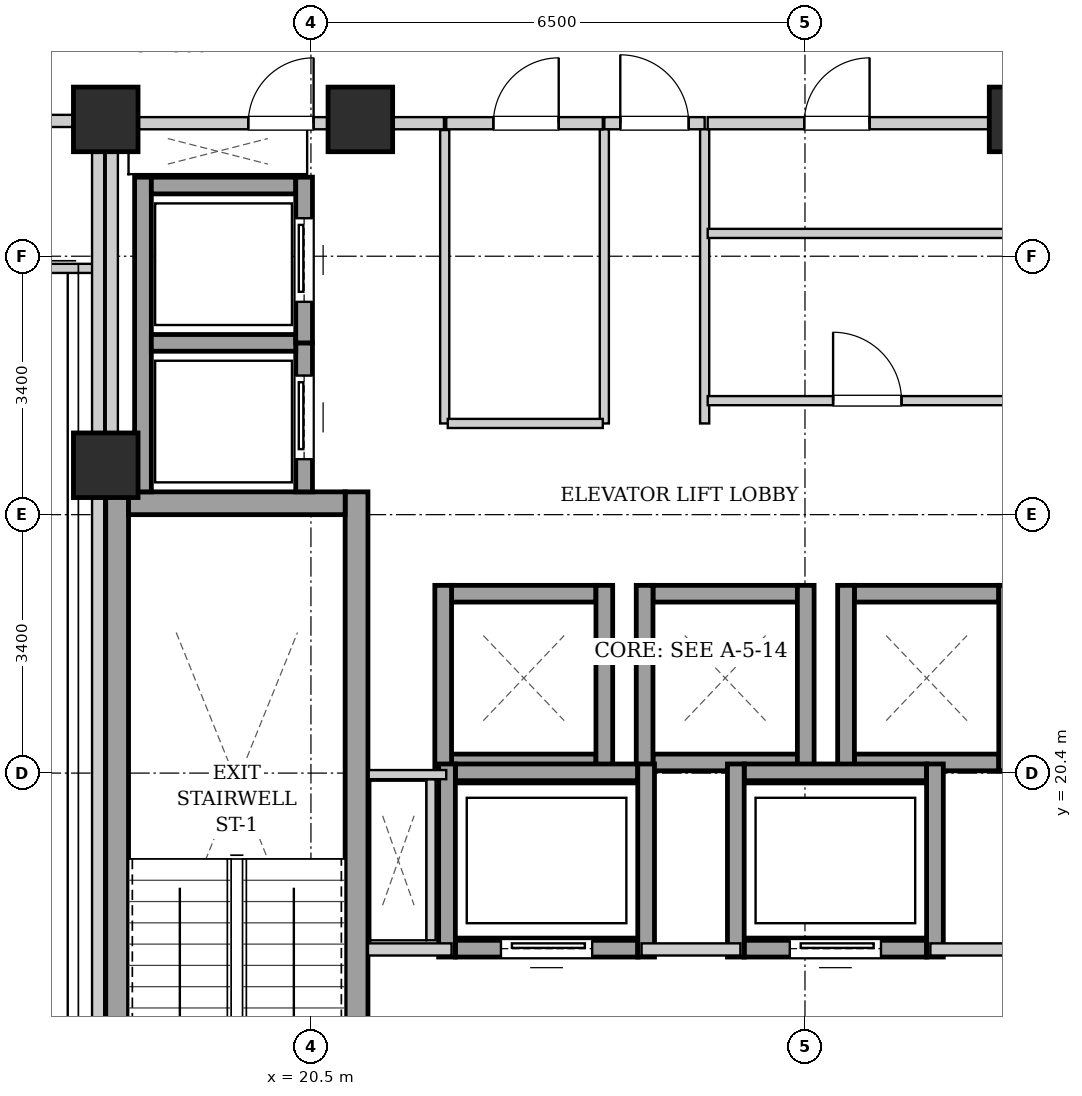
"""IFC4 building model, lengths in metres.
Left out: names, types, materials, properties, quantities, classifications, styles, units other than length and angle.
Written with IfcOpenShell. Run it as: python <this file> out.ifc"""

import sys

from ifc_helpers import new_model, si_unit, direction, frame, frame_2d, origin, origin_2d, place, context, subcontext, project, spatial, rectangle, extrude, element, fill, save


model = new_model("IFC4")
c1 = context("Model", 3, precision=1e-05, world=origin(), true_north=direction((0.0, 1.0)))
c2 = subcontext(c1, "Body", "Model", "MODEL_VIEW")
j1 = project(units=[si_unit("LENGTHUNIT", "METRE"), si_unit("PLANEANGLEUNIT", "RADIAN")], contexts=[c1])
p1 = place(None, origin())
s1 = spatial("IfcSite", under=j1, at=p1, CompositionType="ELEMENT")
p2 = place(p1, origin())
s2 = spatial("IfcBuilding", under=s1, at=p2, CompositionType="ELEMENT")
p3 = place(p2, frame((0.0, 0.0, 177.7)))
s3 = spatial("IfcBuildingStorey", under=s2, at=p3, CompositionType="ELEMENT", Elevation=177.7)
for number, where, z_axis, x_axis in (
    (1, (17.8, 29.0, 0.0), (0.0, 0.0, 1.0), (1.0, 0.0, 0.0)),
    (2, (21.15, 29.0, 0.0), (0.0, 0.0, 1.0), (1.0, 0.0, 0.0)),
    (3, (29.85, 29.0, 0.0), (0.0, 0.0, 1.0), (1.0, 0.0, 0.0)),
    (4, (17.8, 24.45, 0.0), (0.0, 0.0, 1.0), (1.0, 0.0, 0.0)),
):
    element("IfcColumn", number, at=place(p3, frame(where, z_axis=z_axis, x_axis=x_axis)), inside=s3, PredefinedType="COLUMN", context=c2, shape_type="SweptSolid", body=[
        extrude(rectangle(XDim=0.85, YDim=0.85, at=origin_2d()), origin(), (0.0, 0.0, 1.0), 3.3),
    ])
for number, where, z_axis, x_axis in (
    (5, (17.95, 15.1, 0.0), (0.0, 0.0, 1.0), (0.0, 1.0, 0.0)),
    (6, (21.1, 15.1, 0.0), (0.0, 0.0, 1.0), (0.0, 1.0, 0.0)),
):
    element("IfcWall", number, at=place(p3, frame(where, z_axis=z_axis, x_axis=x_axis)), inside=s3, PredefinedType="SHEAR", context=c2, shape_type="SweptSolid", body=[
        extrude(rectangle(XDim=9.0, YDim=0.3, at=frame_2d((4.5, 0.0))), origin(), (0.0, 0.0, 1.0), 3.04),
    ])
p4 = place(p3, frame((18.1, 23.95, 0.0), z_axis=(0.0, 0.0, 1.0), x_axis=(1.0, 0.0, 0.0)))
e7 = element("IfcWall", 7, at=p4, inside=s3, PredefinedType="SHEAR", context=c2, shape_type="SweptSolid", body=[
    extrude(rectangle(XDim=2.85, YDim=0.3, at=frame_2d((1.425, 0.0))), origin(), (0.0, 0.0, 1.0), 3.04),
])
for number, where, z_axis, x_axis in (
    (8, (22.35, 20.54, 0.0), (0.0, 0.0, 1.0), (1.0, 0.0, 0.0)),
    (9, (22.35, 22.76, 0.0), (0.0, 0.0, 1.0), (1.0, 0.0, 0.0)),
):
    element("IfcWall", number, at=place(p3, frame(where, z_axis=z_axis, x_axis=x_axis)), inside=s3, PredefinedType="SHEAR", context=c2, shape_type="SweptSolid", body=[
        extrude(rectangle(XDim=1.9, YDim=0.22, at=frame_2d((0.95, 0.0))), origin(), (0.0, 0.0, 1.0), 3.04),
    ])
for number, where, z_axis, x_axis in (
    (10, (22.24, 20.43, 0.0), (0.0, 0.0, 1.0), (0.0, 1.0, 0.0)),
    (11, (24.36, 20.43, 0.0), (0.0, 0.0, 1.0), (0.0, 1.0, 0.0)),
):
    element("IfcWall", number, at=place(p3, frame(where, z_axis=z_axis, x_axis=x_axis)), inside=s3, PredefinedType="SHEAR", context=c2, shape_type="SweptSolid", body=[
        extrude(rectangle(XDim=2.44, YDim=0.22, at=frame_2d((1.22, 0.0))), origin(), (0.0, 0.0, 1.0), 3.04),
    ])
for number, where, z_axis, x_axis in (
    (12, (25.0, 20.54, 0.0), (0.0, 0.0, 1.0), (1.0, 0.0, 0.0)),
    (13, (25.0, 22.76, 0.0), (0.0, 0.0, 1.0), (1.0, 0.0, 0.0)),
):
    element("IfcWall", number, at=place(p3, frame(where, z_axis=z_axis, x_axis=x_axis)), inside=s3, PredefinedType="SHEAR", context=c2, shape_type="SweptSolid", body=[
        extrude(rectangle(XDim=1.9, YDim=0.22, at=frame_2d((0.95, 0.0))), origin(), (0.0, 0.0, 1.0), 3.04),
    ])
for number, where, z_axis, x_axis in (
    (14, (24.89, 20.43, 0.0), (0.0, 0.0, 1.0), (0.0, 1.0, 0.0)),
    (15, (27.01, 20.43, 0.0), (0.0, 0.0, 1.0), (0.0, 1.0, 0.0)),
):
    element("IfcWall", number, at=place(p3, frame(where, z_axis=z_axis, x_axis=x_axis)), inside=s3, PredefinedType="SHEAR", context=c2, shape_type="SweptSolid", body=[
        extrude(rectangle(XDim=2.44, YDim=0.22, at=frame_2d((1.22, 0.0))), origin(), (0.0, 0.0, 1.0), 3.04),
    ])
for number, where, z_axis, x_axis in (
    (16, (27.65, 20.54, 0.0), (0.0, 0.0, 1.0), (1.0, 0.0, 0.0)),
    (17, (27.65, 22.76, 0.0), (0.0, 0.0, 1.0), (1.0, 0.0, 0.0)),
):
    element("IfcWall", number, at=place(p3, frame(where, z_axis=z_axis, x_axis=x_axis)), inside=s3, PredefinedType="SHEAR", context=c2, shape_type="SweptSolid", body=[
        extrude(rectangle(XDim=1.9, YDim=0.22, at=frame_2d((0.95, 0.0))), origin(), (0.0, 0.0, 1.0), 3.04),
    ])
for number, where, z_axis, x_axis in (
    (18, (27.54, 20.43, 0.0), (0.0, 0.0, 1.0), (0.0, 1.0, 0.0)),
    (19, (29.66, 20.43, 0.0), (0.0, 0.0, 1.0), (0.0, 1.0, 0.0)),
):
    element("IfcWall", number, at=place(p3, frame(where, z_axis=z_axis, x_axis=x_axis)), inside=s3, PredefinedType="SHEAR", context=c2, shape_type="SweptSolid", body=[
        extrude(rectangle(XDim=2.44, YDim=0.22, at=frame_2d((1.22, 0.0))), origin(), (0.0, 0.0, 1.0), 3.04),
    ])
p5 = place(p3, frame((18.29, 24.1, 0.0), z_axis=(0.0, 0.0, 1.0), x_axis=(0.0, 1.0, 0.0)))
e20 = element("IfcWall", 20, at=p5, inside=s3, PredefinedType="SHEAR", context=c2, shape_type="SweptSolid", body=[
    extrude(rectangle(XDim=4.14, YDim=0.22, at=frame_2d((2.07, 0.0))), origin(), (0.0, 0.0, 1.0), 3.04),
])
p6 = place(p3, frame((20.41, 24.1, 0.0), z_axis=(0.0, 0.0, 1.0), x_axis=(0.0, 1.0, 0.0)))
e21 = element("IfcWall", 21, at=p6, inside=s3, PredefinedType="SHEAR", context=c2, shape_type="SweptSolid", body=[
    extrude(rectangle(XDim=1.96, YDim=0.22, at=frame_2d((0.98, 0.0))), origin(), (0.0, 0.0, 1.0), 3.04),
])
p7 = place(p6, frame((0.43, 0.0, 0.0)))
e22 = element("IfcOpeningElement", 22, at=p7, cuts=e21, PredefinedType="OPENING", context=c2, shape_type="SweptSolid", body=[
    extrude(rectangle(XDim=1.1, YDim=2.15, at=frame_2d((0.55, 1.075))), frame((0.0, 0.12, 0.0), z_axis=(0.0, -1.0, 0.0), x_axis=(1.0, 0.0, 0.0)), (0.0, 0.0, 1.0), 0.24),
])
for number, where, z_axis, x_axis in (
    (23, (18.4, 26.06, 0.0), (0.0, 0.0, 1.0), (1.0, 0.0, 0.0)),
    (24, (18.4, 28.13, 0.0), (0.0, 0.0, 1.0), (1.0, 0.0, 0.0)),
):
    element("IfcWall", number, at=place(p3, frame(where, z_axis=z_axis, x_axis=x_axis)), inside=s3, PredefinedType="SHEAR", context=c2, shape_type="SweptSolid", body=[
        extrude(rectangle(XDim=1.9, YDim=0.22, at=frame_2d((0.95, 0.0))), origin(), (0.0, 0.0, 1.0), 3.04),
    ])
p8 = place(p3, frame((20.41, 26.06, 0.0), z_axis=(0.0, 0.0, 1.0), x_axis=(0.0, 1.0, 0.0)))
e25 = element("IfcWall", 25, at=p8, inside=s3, PredefinedType="SHEAR", context=c2, shape_type="SweptSolid", body=[
    extrude(rectangle(XDim=2.18, YDim=0.22, at=frame_2d((1.09, 0.0))), origin(), (0.0, 0.0, 1.0), 3.04),
])
p9 = place(p8, frame((0.54, 0.0, 0.0)))
e26 = element("IfcOpeningElement", 26, at=p9, cuts=e25, PredefinedType="OPENING", context=c2, shape_type="SweptSolid", body=[
    extrude(rectangle(XDim=1.1, YDim=2.15, at=frame_2d((0.55, 1.075))), frame((0.0, 0.12, 0.0), z_axis=(0.0, -1.0, 0.0), x_axis=(1.0, 0.0, 0.0)), (0.0, 0.0, 1.0), 0.24),
])
p10 = place(p3, frame((22.4, 18.09, 0.0), z_axis=(0.0, 0.0, 1.0), x_axis=(1.0, 0.0, 0.0)))
e27 = element("IfcWall", 27, at=p10, inside=s3, PredefinedType="SHEAR", context=c2, shape_type="SweptSolid", body=[
    extrude(rectangle(XDim=2.4, YDim=0.22, at=frame_2d((1.2, 0.0))), origin(), (0.0, 0.0, 1.0), 3.04),
])
p11 = place(p10, frame((0.6, 0.0, 0.0)))
e28 = element("IfcOpeningElement", 28, at=p11, cuts=e27, PredefinedType="OPENING", context=c2, shape_type="SweptSolid", body=[
    extrude(rectangle(XDim=1.2, YDim=2.15, at=frame_2d((0.6, 1.075))), frame((0.0, 0.12, 0.0), z_axis=(0.0, -1.0, 0.0), x_axis=(1.0, 0.0, 0.0)), (0.0, 0.0, 1.0), 0.24),
])
p12 = place(p3, frame((22.4, 20.41, 0.0), z_axis=(0.0, 0.0, 1.0), x_axis=(1.0, 0.0, 0.0)))
e29 = element("IfcWall", 29, at=p12, inside=s3, PredefinedType="SHEAR", context=c2, shape_type="SweptSolid", body=[
    extrude(rectangle(XDim=2.4, YDim=0.22, at=frame_2d((1.2, 0.0))), origin(), (0.0, 0.0, 1.0), 3.04),
])
for number, where, z_axis, x_axis in (
    (30, (22.29, 17.98, 0.0), (0.0, 0.0, 1.0), (0.0, 1.0, 0.0)),
    (31, (24.91, 17.98, 0.0), (0.0, 0.0, 1.0), (0.0, 1.0, 0.0)),
):
    element("IfcWall", number, at=place(p3, frame(where, z_axis=z_axis, x_axis=x_axis)), inside=s3, PredefinedType="SHEAR", context=c2, shape_type="SweptSolid", body=[
        extrude(rectangle(XDim=2.54, YDim=0.22, at=frame_2d((1.27, 0.0))), origin(), (0.0, 0.0, 1.0), 3.04),
    ])
p13 = place(p3, frame((26.2, 18.09, 0.0), z_axis=(0.0, 0.0, 1.0), x_axis=(1.0, 0.0, 0.0)))
e32 = element("IfcWall", 32, at=p13, inside=s3, PredefinedType="SHEAR", context=c2, shape_type="SweptSolid", body=[
    extrude(rectangle(XDim=2.4, YDim=0.22, at=frame_2d((1.2, 0.0))), origin(), (0.0, 0.0, 1.0), 3.04),
])
p14 = place(p13, frame((0.6, 0.0, 0.0)))
e33 = element("IfcOpeningElement", 33, at=p14, cuts=e32, PredefinedType="OPENING", context=c2, shape_type="SweptSolid", body=[
    extrude(rectangle(XDim=1.2, YDim=2.15, at=frame_2d((0.6, 1.075))), frame((0.0, 0.12, 0.0), z_axis=(0.0, -1.0, 0.0), x_axis=(1.0, 0.0, 0.0)), (0.0, 0.0, 1.0), 0.24),
])
p15 = place(p3, frame((26.2, 20.41, 0.0), z_axis=(0.0, 0.0, 1.0), x_axis=(1.0, 0.0, 0.0)))
e34 = element("IfcWall", 34, at=p15, inside=s3, PredefinedType="SHEAR", context=c2, shape_type="SweptSolid", body=[
    extrude(rectangle(XDim=2.4, YDim=0.22, at=frame_2d((1.2, 0.0))), origin(), (0.0, 0.0, 1.0), 3.04),
])
for number, where, z_axis, x_axis in (
    (35, (26.09, 17.98, 0.0), (0.0, 0.0, 1.0), (0.0, 1.0, 0.0)),
    (36, (28.71, 17.98, 0.0), (0.0, 0.0, 1.0), (0.0, 1.0, 0.0)),
):
    element("IfcWall", number, at=place(p3, frame(where, z_axis=z_axis, x_axis=x_axis)), inside=s3, PredefinedType="SHEAR", context=c2, shape_type="SweptSolid", body=[
        extrude(rectangle(XDim=2.54, YDim=0.22, at=frame_2d((1.27, 0.0))), origin(), (0.0, 0.0, 1.0), 3.04),
    ])
p16 = place(p3, frame((21.25, 18.08, 0.0), z_axis=(0.0, 0.0, 1.0), x_axis=(1.0, 0.0, 0.0)))
e37 = element("IfcWall", 37, at=p16, inside=s3, PredefinedType="PARTITIONING", context=c2, shape_type="SweptSolid", body=[
    extrude(rectangle(XDim=1.1, YDim=0.16, at=frame_2d((0.55, 0.0))), origin(), (0.0, 0.0, 1.0), 3.04),
])
p17 = place(p3, frame((24.85, 18.08, 0.0), z_axis=(0.0, 0.0, 1.0), x_axis=(1.0, 0.0, 0.0)))
e38 = element("IfcWall", 38, at=p17, inside=s3, PredefinedType="PARTITIONING", context=c2, shape_type="SweptSolid", body=[
    extrude(rectangle(XDim=1.3, YDim=0.16, at=frame_2d((0.65, 0.0))), origin(), (0.0, 0.0, 1.0), 3.04),
])
p18 = place(p3, frame((28.65, 18.08, 0.0), z_axis=(0.0, 0.0, 1.0), x_axis=(1.0, 0.0, 0.0)))
e39 = element("IfcWall", 39, at=p18, inside=s3, PredefinedType="PARTITIONING", context=c2, shape_type="SweptSolid", body=[
    extrude(rectangle(XDim=1.1, YDim=0.16, at=frame_2d((0.55, 0.0))), origin(), (0.0, 0.0, 1.0), 3.04),
])
p19 = place(p3, frame((17.88, 24.12, 0.0), z_axis=(0.0, 0.0, 1.0), x_axis=(0.0, 1.0, 0.0)))
e40 = element("IfcWall", 40, at=p19, inside=s3, PredefinedType="PARTITIONING", context=c2, shape_type="SweptSolid", body=[
    extrude(rectangle(XDim=4.76, YDim=0.16, at=frame_2d((2.38, 0.0))), origin(), (0.0, 0.0, 1.0), 2.375),
])
p20 = place(p3, frame((24.36, 28.95, 0.0), z_axis=(0.0, 0.0, 1.0), x_axis=(1.0, 0.0, 0.0)))
e41 = element("IfcWall", 41, at=p20, inside=s3, PredefinedType="PARTITIONING", context=c2, shape_type="SweptSolid", body=[
    extrude(rectangle(XDim=1.32, YDim=0.16, at=frame_2d((0.66, 0.0))), origin(), (0.0, 0.0, 1.0), 2.556),
])
p21 = place(p20, frame((0.21, 0.0, 0.0)))
e42 = element("IfcOpeningElement", 42, at=p21, cuts=e41, PredefinedType="OPENING", context=c2, shape_type="SweptSolid", body=[
    extrude(rectangle(XDim=0.9, YDim=2.05, at=frame_2d((0.45, 1.025))), frame((0.0, 0.09, 0.0), z_axis=(0.0, -1.0, 0.0), x_axis=(1.0, 0.0, 0.0)), (0.0, 0.0, 1.0), 0.18),
])
p22 = place(p3, frame((17.96, 28.95, 0.0), z_axis=(0.0, 0.0, 1.0), x_axis=(1.0, 0.0, 0.0)))
e43 = element("IfcWall", 43, at=p22, inside=s3, PredefinedType="PARTITIONING", context=c2, shape_type="SweptSolid", body=[
    extrude(rectangle(XDim=4.29, YDim=0.16, at=frame_2d((2.145, 0.0))), origin(), (0.0, 0.0, 1.0), 2.556),
])
p23 = place(p22, frame((1.715, 0.0, 0.0)))
e44 = element("IfcOpeningElement", 44, at=p23, cuts=e43, PredefinedType="OPENING", context=c2, shape_type="SweptSolid", body=[
    extrude(rectangle(XDim=0.86, YDim=2.05, at=frame_2d((0.43, 1.025))), frame((0.0, 0.09, 0.0), z_axis=(0.0, -1.0, 0.0), x_axis=(1.0, 0.0, 0.0)), (0.0, 0.0, 1.0), 0.18),
])
p24 = place(p3, frame((22.08, 18.2, 0.0), z_axis=(0.0, 0.0, 1.0), x_axis=(0.0, 1.0, 0.0)))
e45 = element("IfcWall", 45, at=p24, inside=s3, PredefinedType="PARTITIONING", context=c2, shape_type="SweptSolid", body=[
    extrude(rectangle(XDim=2.12, YDim=0.12, at=frame_2d((1.06, 0.0))), origin(), (0.0, 0.0, 1.0), 3.04),
])
p25 = place(p3, frame((22.28, 20.38, 0.0), z_axis=(0.0, 0.0, 1.0), x_axis=(-1.0, 0.0, 0.0)))
e46 = element("IfcWall", 46, at=p25, inside=s3, PredefinedType="PARTITIONING", context=c2, shape_type="SweptSolid", body=[
    extrude(rectangle(XDim=1.02, YDim=0.12, at=frame_2d((0.51, 0.0))), origin(), (0.0, 0.0, 1.0), 3.04),
])
for number, where, z_axis, x_axis in (
    (47, (24.36, 25.0, 0.0), (0.0, 0.0, 1.0), (0.0, 1.0, 0.0)),
    (48, (25.68, 25.0, 0.0), (0.0, 0.0, 1.0), (0.0, 1.0, 0.0)),
):
    element("IfcWall", number, at=place(p3, frame(where, z_axis=z_axis, x_axis=x_axis)), inside=s3, PredefinedType="PARTITIONING", context=c2, shape_type="SweptSolid", body=[
        extrude(rectangle(XDim=3.87, YDim=0.12, at=frame_2d((1.935, 0.0))), origin(), (0.0, 0.0, 1.0), 3.04),
    ])
p26 = place(p3, frame((22.26, 25.0, 0.0), z_axis=(0.0, 0.0, 1.0), x_axis=(0.0, 1.0, 0.0)))
e49 = element("IfcWall", 49, at=p26, inside=s3, PredefinedType="PARTITIONING", context=c2, shape_type="SweptSolid", body=[
    extrude(rectangle(XDim=3.86, YDim=0.12, at=frame_2d((1.93, 0.0))), origin(), (0.0, 0.0, 1.0), 3.04),
])
p27 = place(p3, frame((22.3, 25.0, 0.0), z_axis=(0.0, 0.0, 1.0), x_axis=(1.0, 0.0, 0.0)))
e50 = element("IfcWall", 50, at=p27, inside=s3, PredefinedType="PARTITIONING", context=c2, shape_type="SweptSolid", body=[
    extrude(rectangle(XDim=2.04, YDim=0.12, at=frame_2d((1.02, 0.0))), origin(), (0.0, 0.0, 1.0), 3.04),
])
p28 = place(p3, frame((22.28, 28.95, 0.0), z_axis=(0.0, 0.0, 1.0), x_axis=(1.0, 0.0, 0.0)))
e51 = element("IfcWall", 51, at=p28, inside=s3, PredefinedType="PARTITIONING", context=c2, shape_type="SweptSolid", body=[
    extrude(rectangle(XDim=2.06, YDim=0.16, at=frame_2d((1.03, 0.0))), origin(), (0.0, 0.0, 1.0), 2.556),
])
p29 = place(p28, frame((0.62, 0.0, 0.0)))
e52 = element("IfcOpeningElement", 52, at=p29, cuts=e51, PredefinedType="OPENING", context=c2, shape_type="SweptSolid", body=[
    extrude(rectangle(XDim=0.86, YDim=2.05, at=frame_2d((0.43, 1.025))), frame((0.0, 0.09, 0.0), z_axis=(0.0, -1.0, 0.0), x_axis=(1.0, 0.0, 0.0)), (0.0, 0.0, 1.0), 0.18),
])
p30 = place(p3, frame((25.72, 27.5, 0.0), z_axis=(0.0, 0.0, 1.0), x_axis=(1.0, 0.0, 0.0)))
e53 = element("IfcWall", 53, at=p30, inside=s3, PredefinedType="PARTITIONING", context=c2, shape_type="SweptSolid", body=[
    extrude(rectangle(XDim=4.36, YDim=0.12, at=frame_2d((2.18, 0.0))), origin(), (0.0, 0.0, 1.0), 3.04),
])
p31 = place(p3, frame((25.72, 25.3, 0.0), z_axis=(0.0, 0.0, 1.0), x_axis=(1.0, 0.0, 0.0)))
e54 = element("IfcWall", 54, at=p31, inside=s3, PredefinedType="PARTITIONING", context=c2, shape_type="SweptSolid", body=[
    extrude(rectangle(XDim=4.32, YDim=0.12, at=frame_2d((2.16, 0.0))), origin(), (0.0, 0.0, 1.0), 3.04),
])
p32 = place(p31, frame((1.65, 0.0, 0.0)))
e55 = element("IfcOpeningElement", 55, at=p32, cuts=e54, PredefinedType="OPENING", context=c2, shape_type="SweptSolid", body=[
    extrude(rectangle(XDim=0.9, YDim=2.05, at=frame_2d((0.45, 1.025))), frame((0.0, 0.07, 0.0), z_axis=(0.0, -1.0, 0.0), x_axis=(1.0, 0.0, 0.0)), (0.0, 0.0, 1.0), 0.14),
])
p33 = place(p3, frame((25.72, 28.95, 0.0), z_axis=(0.0, 0.0, 1.0), x_axis=(1.0, 0.0, 0.0)))
e56 = element("IfcWall", 56, at=p33, inside=s3, PredefinedType="PARTITIONING", context=c2, shape_type="SweptSolid", body=[
    extrude(rectangle(XDim=7.32, YDim=0.16, at=frame_2d((3.66, 0.0))), origin(), (0.0, 0.0, 1.0), 2.556),
])
p34 = place(p33, frame((1.27, 0.0, 0.0)))
e57 = element("IfcOpeningElement", 57, at=p34, cuts=e56, PredefinedType="OPENING", context=c2, shape_type="SweptSolid", body=[
    extrude(rectangle(XDim=0.86, YDim=2.05, at=frame_2d((0.43, 1.025))), frame((0.0, 0.09, 0.0), z_axis=(0.0, -1.0, 0.0), x_axis=(1.0, 0.0, 0.0)), (0.0, 0.0, 1.0), 0.18),
])
p35 = place(p3, frame((10.88, 28.98, 0.0), z_axis=(0.0, 0.0, 1.0), x_axis=(1.0, 0.0, 0.0)))
e58 = element("IfcWall", 58, at=p35, inside=s3, PredefinedType="PARTITIONING", context=c2, shape_type="SweptSolid", body=[
    extrude(rectangle(XDim=6.88, YDim=0.16, at=frame_2d((3.44, 0.0))), origin(), (0.0, 0.0, 1.0), 2.556),
])
p36 = place(p35, frame((4.25, 0.0, 0.0)))
e59 = element("IfcOpeningElement", 59, at=p36, cuts=e58, PredefinedType="OPENING", context=c2, shape_type="SweptSolid", body=[
    extrude(rectangle(XDim=0.9, YDim=2.05, at=frame_2d((0.45, 1.025))), frame((0.0, 0.09, 0.0), z_axis=(0.0, -1.0, 0.0), x_axis=(1.0, 0.0, 0.0)), (0.0, 0.0, 1.0), 0.18),
])
p37 = place(p3, frame((10.88, 27.04, 0.0), z_axis=(0.0, 0.0, 1.0), x_axis=(1.0, 0.0, 0.0)))
e60 = element("IfcWall", 60, at=p37, inside=s3, PredefinedType="PARTITIONING", context=c2, shape_type="SweptSolid", body=[
    extrude(rectangle(XDim=6.88, YDim=0.12, at=frame_2d((3.44, 0.0))), origin(), (0.0, 0.0, 1.0), 3.04),
])
p38 = place(p3, frame((17.7, 15.02, 0.0), z_axis=(0.0, 0.0, 1.0), x_axis=(0.0, 1.0, 0.0)))
e61 = element("IfcWall", 61, at=p38, inside=s3, PredefinedType="PARTITIONING", context=c2, shape_type="SweptSolid", body=[
    extrude(rectangle(XDim=13.98, YDim=0.16, at=frame_2d((6.99, 0.0))), origin(), (0.0, 0.0, 1.0), 2.375),
])
p39 = place(p7, origin())
e62 = element("IfcDoor", 62, at=p39, inside=s3, OperationType="SLIDING_TO_LEFT", PredefinedType="DOOR", context=c2, shape_type="SweptSolid", body=[
    extrude(rectangle(XDim=1.1, YDim=2.15, at=frame_2d((0.55, 1.075))), frame((0.0, 0.025, 0.0), z_axis=(0.0, -1.0, 0.0), x_axis=(1.0, 0.0, 0.0)), (0.0, 0.0, 1.0), 0.05),
])
fill(e22, e62)
p40 = place(p9, origin())
e63 = element("IfcDoor", 63, at=p40, inside=s3, OperationType="SLIDING_TO_LEFT", PredefinedType="DOOR", context=c2, shape_type="SweptSolid", body=[
    extrude(rectangle(XDim=1.1, YDim=2.15, at=frame_2d((0.55, 1.075))), frame((0.0, 0.025, 0.0), z_axis=(0.0, -1.0, 0.0), x_axis=(1.0, 0.0, 0.0)), (0.0, 0.0, 1.0), 0.05),
])
fill(e26, e63)
p41 = place(p11, origin())
e64 = element("IfcDoor", 64, at=p41, inside=s3, OperationType="SLIDING_TO_LEFT", PredefinedType="DOOR", context=c2, shape_type="SweptSolid", body=[
    extrude(rectangle(XDim=1.2, YDim=2.15, at=frame_2d((0.6, 1.075))), frame((0.0, 0.025, 0.0), z_axis=(0.0, -1.0, 0.0), x_axis=(1.0, 0.0, 0.0)), (0.0, 0.0, 1.0), 0.05),
])
fill(e28, e64)
p42 = place(p14, origin())
e65 = element("IfcDoor", 65, at=p42, inside=s3, OperationType="SLIDING_TO_LEFT", PredefinedType="DOOR", context=c2, shape_type="SweptSolid", body=[
    extrude(rectangle(XDim=1.2, YDim=2.15, at=frame_2d((0.6, 1.075))), frame((0.0, 0.025, 0.0), z_axis=(0.0, -1.0, 0.0), x_axis=(1.0, 0.0, 0.0)), (0.0, 0.0, 1.0), 0.05),
])
fill(e33, e65)
p43 = place(p21, origin())
e66 = element("IfcDoor", 66, at=p43, inside=s3, OperationType="SINGLE_SWING_LEFT", PredefinedType="DOOR", context=c2, shape_type="SweptSolid", body=[
    extrude(rectangle(XDim=0.9, YDim=2.05, at=frame_2d((0.45, 1.025))), frame((0.0, 0.025, 0.0), z_axis=(0.0, -1.0, 0.0), x_axis=(1.0, 0.0, 0.0)), (0.0, 0.0, 1.0), 0.05),
])
fill(e42, e66)
p44 = place(p23, origin())
e67 = element("IfcDoor", 67, at=p44, inside=s3, OperationType="SINGLE_SWING_RIGHT", PredefinedType="DOOR", context=c2, shape_type="SweptSolid", body=[
    extrude(rectangle(XDim=0.86, YDim=2.05, at=frame_2d((0.43, 1.025))), frame((0.0, 0.025, 0.0), z_axis=(0.0, -1.0, 0.0), x_axis=(1.0, 0.0, 0.0)), (0.0, 0.0, 1.0), 0.05),
])
fill(e44, e67)
p45 = place(p29, origin())
e68 = element("IfcDoor", 68, at=p45, inside=s3, OperationType="SINGLE_SWING_RIGHT", PredefinedType="DOOR", context=c2, shape_type="SweptSolid", body=[
    extrude(rectangle(XDim=0.86, YDim=2.05, at=frame_2d((0.43, 1.025))), frame((0.0, 0.025, 0.0), z_axis=(0.0, -1.0, 0.0), x_axis=(1.0, 0.0, 0.0)), (0.0, 0.0, 1.0), 0.05),
])
fill(e52, e68)
p46 = place(p32, origin())
e69 = element("IfcDoor", 69, at=p46, inside=s3, OperationType="SINGLE_SWING_LEFT", PredefinedType="DOOR", context=c2, shape_type="SweptSolid", body=[
    extrude(rectangle(XDim=0.9, YDim=2.05, at=frame_2d((0.45, 1.025))), frame((0.0, 0.025, 0.0), z_axis=(0.0, -1.0, 0.0), x_axis=(1.0, 0.0, 0.0)), (0.0, 0.0, 1.0), 0.05),
])
fill(e55, e69)
p47 = place(p34, origin())
e70 = element("IfcDoor", 70, at=p47, inside=s3, OperationType="SINGLE_SWING_RIGHT", PredefinedType="DOOR", context=c2, shape_type="SweptSolid", body=[
    extrude(rectangle(XDim=0.86, YDim=2.05, at=frame_2d((0.43, 1.025))), frame((0.0, 0.025, 0.0), z_axis=(0.0, -1.0, 0.0), x_axis=(1.0, 0.0, 0.0)), (0.0, 0.0, 1.0), 0.05),
])
fill(e57, e70)
save(model, sys.argv[1])
